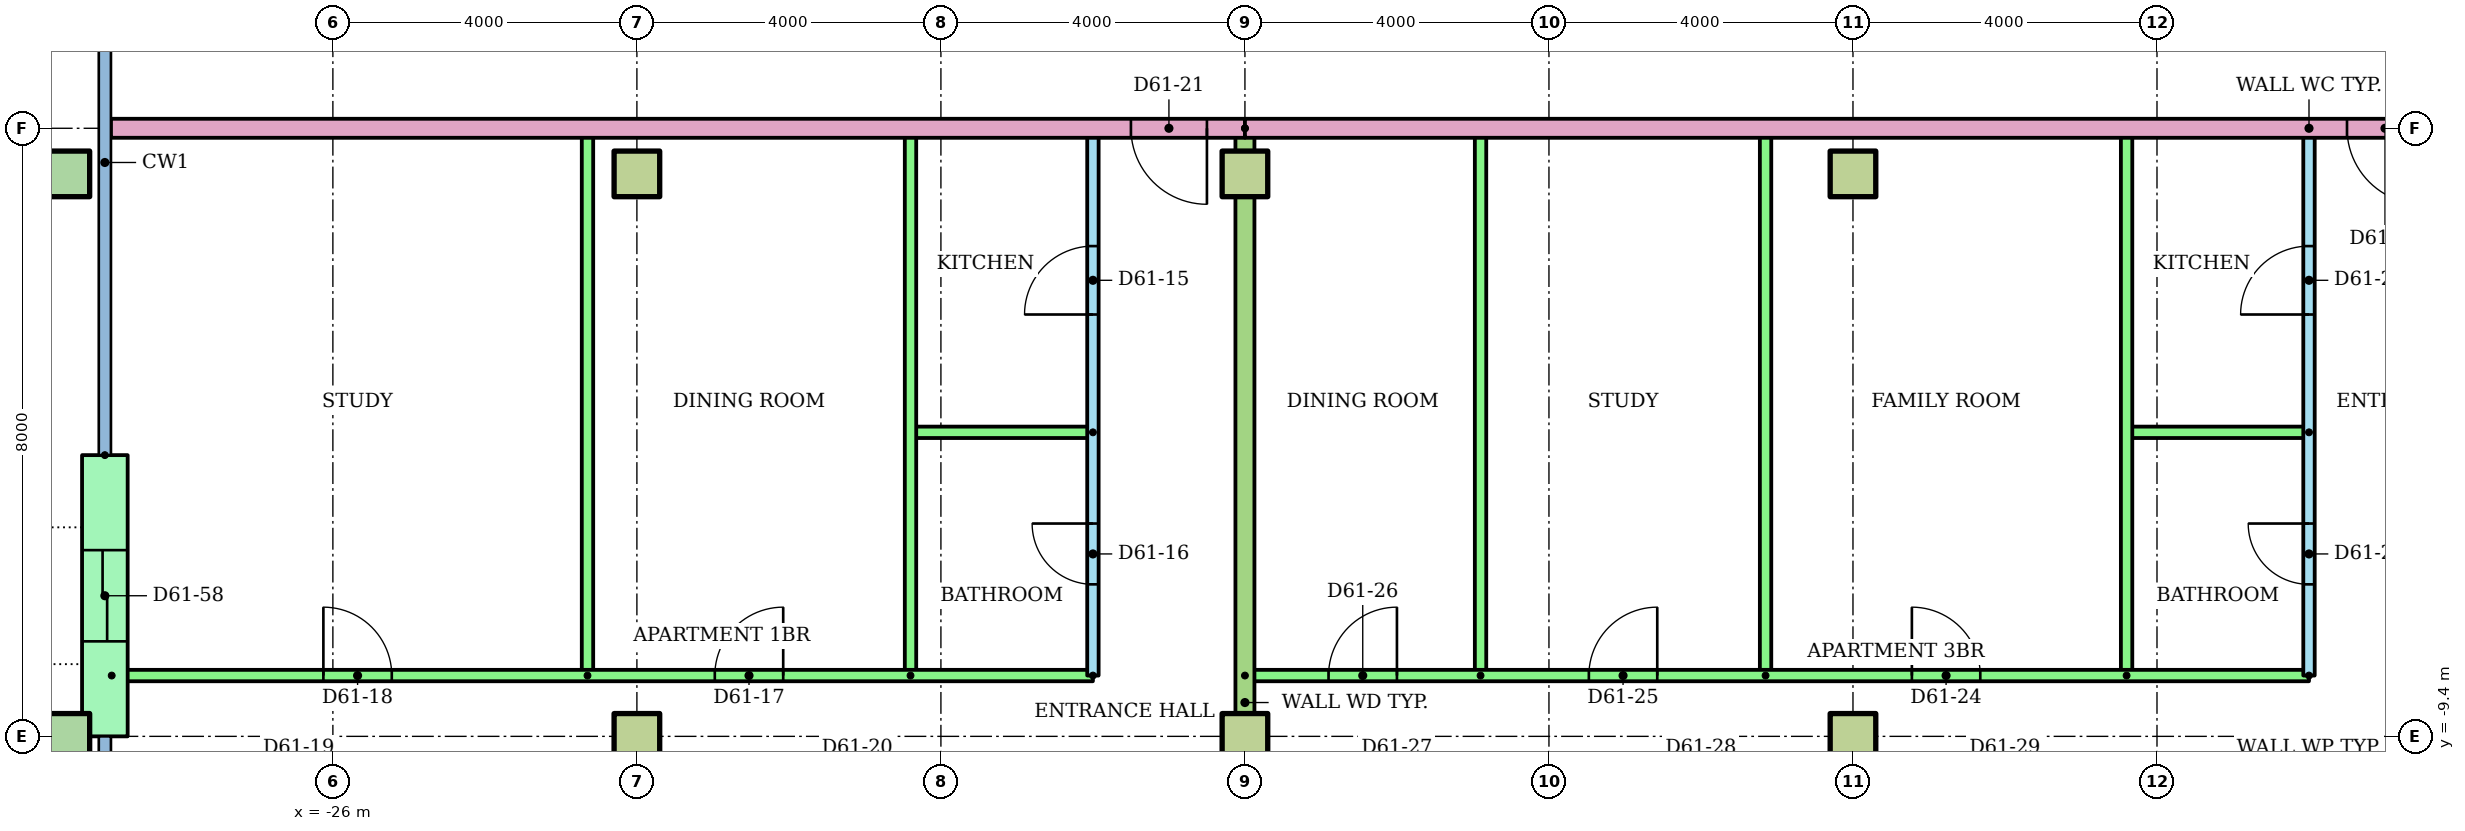
"""IFC4 building model, lengths in metres.
Left out: names, types, materials, properties, quantities, classifications, styles, units other than length and angle.
Written with IfcOpenShell. Run it as: python <this file> out.ifc"""

import sys

from ifc_helpers import new_model, si_unit, direction, frame, frame_2d, origin, origin_2d, place, context, subcontext, project, spatial, rectangle, hollow_rectangle, extrude, element, fill, save


model = new_model("IFC4")
c1 = context("Model", 3, precision=1e-05, world=origin(), true_north=direction((0.0, 1.0)))
c2 = subcontext(c1, "Body", "Model", "MODEL_VIEW")
j1 = project(units=[si_unit("LENGTHUNIT", "METRE"), si_unit("PLANEANGLEUNIT", "RADIAN")], contexts=[c1])
p1 = place(None, origin())
s1 = spatial("IfcSite", under=j1, at=p1, CompositionType="ELEMENT")
p2 = place(p1, origin())
s2 = spatial("IfcBuilding", under=s1, at=p2, CompositionType="ELEMENT")
p3 = place(p2, frame((0.0, 0.0, 233.2)))
s3 = spatial("IfcBuildingStorey", under=s2, at=p3, CompositionType="ELEMENT", Elevation=233.2)
p4 = place(p3, frame((-29.5, -9.4, 0.0)))
e1 = element("IfcColumn", 1, at=p4, inside=s3, PredefinedType="COLUMN", context=c2, shape_type="SweptSolid", body=[
    extrude(hollow_rectangle(XDim=0.6, YDim=0.6, WallThickness=0.03, at=origin_2d()), origin(), (0.0, 0.0, 1.0), 3.2),
])
for number, where in (
    (2, (-22.0, -9.4, 0.0)),
    (3, (-14.0, -9.4, 0.0)),
    (4, (-6.0, -9.4, 0.0)),
):
    element("IfcColumn", number, at=place(p3, frame(where)), inside=s3, PredefinedType="COLUMN", context=c2, shape_type="SweptSolid", body=[
        extrude(rectangle(XDim=0.6, YDim=0.6, at=origin_2d()), origin(), (0.0, 0.0, 1.0), 3.2),
    ])
p5 = place(p3, frame((-29.5, -2.0, 0.0)))
e5 = element("IfcColumn", 5, at=p5, inside=s3, PredefinedType="COLUMN", context=c2, shape_type="SweptSolid", body=[
    extrude(hollow_rectangle(XDim=0.6, YDim=0.6, WallThickness=0.03, at=origin_2d()), origin(), (0.0, 0.0, 1.0), 3.2),
])
for number, where in (
    (6, (-22.0, -2.0, 0.0)),
    (7, (-14.0, -2.0, 0.0)),
    (8, (-6.0, -2.0, 0.0)),
):
    element("IfcColumn", number, at=place(p3, frame(where)), inside=s3, PredefinedType="COLUMN", context=c2, shape_type="SweptSolid", body=[
        extrude(rectangle(XDim=0.6, YDim=0.6, at=origin_2d()), origin(), (0.0, 0.0, 1.0), 3.2),
    ])
p6 = place(p3, frame((-29.0, -5.7, 0.0), z_axis=(0.0, 0.0, 1.0), x_axis=(0.0, -1.0, 0.0)))
e9 = element("IfcWall", 9, at=p6, inside=s3, PredefinedType="STANDARD", context=c2, shape_type="SweptSolid", body=[
    extrude(rectangle(XDim=3.7, YDim=0.6, at=frame_2d((1.85, 0.0))), origin(), (0.0, 0.0, 1.0), 2.92),
])
p7 = place(p6, frame((1.25, 0.0, 0.0)))
e10 = element("IfcOpeningElement", 10, at=p7, cuts=e9, PredefinedType="OPENING", context=c2, shape_type="SweptSolid", body=[
    extrude(rectangle(XDim=1.2, YDim=2.1, at=frame_2d((0.6, 1.05))), frame((0.0, 0.31, 0.0), z_axis=(0.0, -1.0, 0.0), x_axis=(1.0, 0.0, 0.0)), (0.0, 0.0, 1.0), 0.62),
])
p8 = place(p3, frame((-16.0, -8.6, 0.0), z_axis=(0.0, 0.0, 1.0), x_axis=(0.0, 1.0, 0.0)))
e11 = element("IfcWall", 11, at=p8, inside=s3, PredefinedType="PARTITIONING", context=c2, shape_type="SweptSolid", body=[
    extrude(rectangle(XDim=7.2, YDim=0.15, at=frame_2d((3.6, 0.0))), origin(), (0.0, 0.0, 1.0), 2.4),
])
p9 = place(p8, frame((4.75, 0.0, 0.0)))
e12 = element("IfcOpeningElement", 12, at=p9, cuts=e11, PredefinedType="OPENING", context=c2, shape_type="SweptSolid", body=[
    extrude(rectangle(XDim=0.9, YDim=2.1, at=frame_2d((0.45, 1.05))), frame((0.0, 0.085, 0.0), z_axis=(0.0, -1.0, 0.0), x_axis=(1.0, 0.0, 0.0)), (0.0, 0.0, 1.0), 0.17),
])
p10 = place(p8, frame((1.2, 0.0, 0.0)))
e13 = element("IfcOpeningElement", 13, at=p10, cuts=e11, PredefinedType="OPENING", context=c2, shape_type="SweptSolid", body=[
    extrude(rectangle(XDim=0.8, YDim=2.1, at=frame_2d((0.4, 1.05))), frame((0.0, 0.085, 0.0), z_axis=(0.0, -1.0, 0.0), x_axis=(1.0, 0.0, 0.0)), (0.0, 0.0, 1.0), 0.17),
])
p11 = place(p3, frame((-16.0, -5.4, 0.0), z_axis=(0.0, 0.0, 1.0), x_axis=(-1.0, 0.0, 0.0)))
e14 = element("IfcWall", 14, at=p11, inside=s3, PredefinedType="PARTITIONING", context=c2, shape_type="SweptSolid", body=[
    extrude(rectangle(XDim=2.4, YDim=0.15, at=frame_2d((1.2, 0.0))), origin(), (0.0, 0.0, 1.0), 2.4),
])
for number, where, z_axis, x_axis in (
    (15, (-18.4, -8.6, 0.0), (0.0, 0.0, 1.0), (0.0, 1.0, 0.0)),
    (16, (-22.65, -8.6, 0.0), (0.0, 0.0, 1.0), (0.0, 1.0, 0.0)),
):
    element("IfcWall", number, at=place(p3, frame(where, z_axis=z_axis, x_axis=x_axis)), inside=s3, PredefinedType="PARTITIONING", context=c2, shape_type="SweptSolid", body=[
        extrude(rectangle(XDim=7.2, YDim=0.15, at=frame_2d((3.6, 0.0))), origin(), (0.0, 0.0, 1.0), 2.4),
    ])
p12 = place(p3, frame((-28.91, -8.6, 0.0)))
e17 = element("IfcWall", 17, at=p12, inside=s3, PredefinedType="PARTITIONING", context=c2, shape_type="SweptSolid", body=[
    extrude(rectangle(XDim=12.91, YDim=0.15, at=frame_2d((6.455, 0.0))), origin(), (0.0, 0.0, 1.0), 2.4),
])
p13 = place(p12, frame((7.935, 0.0, 0.0)))
e18 = element("IfcOpeningElement", 18, at=p13, cuts=e17, PredefinedType="OPENING", context=c2, shape_type="SweptSolid", body=[
    extrude(rectangle(XDim=0.9, YDim=2.1, at=frame_2d((0.45, 1.05))), frame((0.0, 0.085, 0.0), z_axis=(0.0, -1.0, 0.0), x_axis=(1.0, 0.0, 0.0)), (0.0, 0.0, 1.0), 0.17),
])
p14 = place(p12, frame((2.785, 0.0, 0.0)))
e19 = element("IfcOpeningElement", 19, at=p14, cuts=e17, PredefinedType="OPENING", context=c2, shape_type="SweptSolid", body=[
    extrude(rectangle(XDim=0.9, YDim=2.1, at=frame_2d((0.45, 1.05))), frame((0.0, 0.085, 0.0), z_axis=(0.0, -1.0, 0.0), x_axis=(1.0, 0.0, 0.0)), (0.0, 0.0, 1.0), 0.17),
])
p15 = place(p3, frame((0.0, -8.6, 0.0), z_axis=(0.0, 0.0, 1.0), x_axis=(0.0, 1.0, 0.0)))
e20 = element("IfcWall", 20, at=p15, inside=s3, PredefinedType="PARTITIONING", context=c2, shape_type="SweptSolid", body=[
    extrude(rectangle(XDim=7.2, YDim=0.15, at=frame_2d((3.6, 0.0))), origin(), (0.0, 0.0, 1.0), 2.4),
])
p16 = place(p15, frame((4.75, 0.0, 0.0)))
e21 = element("IfcOpeningElement", 21, at=p16, cuts=e20, PredefinedType="OPENING", context=c2, shape_type="SweptSolid", body=[
    extrude(rectangle(XDim=0.9, YDim=2.1, at=frame_2d((0.45, 1.05))), frame((0.0, 0.085, 0.0), z_axis=(0.0, -1.0, 0.0), x_axis=(1.0, 0.0, 0.0)), (0.0, 0.0, 1.0), 0.17),
])
p17 = place(p15, frame((1.2, 0.0, 0.0)))
e22 = element("IfcOpeningElement", 22, at=p17, cuts=e20, PredefinedType="OPENING", context=c2, shape_type="SweptSolid", body=[
    extrude(rectangle(XDim=0.8, YDim=2.1, at=frame_2d((0.4, 1.05))), frame((0.0, 0.085, 0.0), z_axis=(0.0, -1.0, 0.0), x_axis=(1.0, 0.0, 0.0)), (0.0, 0.0, 1.0), 0.17),
])
p18 = place(p3, frame((0.0, -5.4, 0.0), z_axis=(0.0, 0.0, 1.0), x_axis=(-1.0, 0.0, 0.0)))
e23 = element("IfcWall", 23, at=p18, inside=s3, PredefinedType="PARTITIONING", context=c2, shape_type="SweptSolid", body=[
    extrude(rectangle(XDim=2.4, YDim=0.15, at=frame_2d((1.2, 0.0))), origin(), (0.0, 0.0, 1.0), 2.4),
])
for number, where, z_axis, x_axis in (
    (24, (-2.4, -8.6, 0.0), (0.0, 0.0, 1.0), (0.0, 1.0, 0.0)),
    (25, (-7.15, -8.6, 0.0), (0.0, 0.0, 1.0), (0.0, 1.0, 0.0)),
    (26, (-10.9, -8.6, 0.0), (0.0, 0.0, 1.0), (0.0, 1.0, 0.0)),
):
    element("IfcWall", number, at=place(p3, frame(where, z_axis=z_axis, x_axis=x_axis)), inside=s3, PredefinedType="PARTITIONING", context=c2, shape_type="SweptSolid", body=[
        extrude(rectangle(XDim=7.2, YDim=0.15, at=frame_2d((3.6, 0.0))), origin(), (0.0, 0.0, 1.0), 2.4),
    ])
p19 = place(p3, frame((-14.0, -8.6, 0.0)))
e27 = element("IfcWall", 27, at=p19, inside=s3, PredefinedType="PARTITIONING", context=c2, shape_type="SweptSolid", body=[
    extrude(rectangle(XDim=14.0, YDim=0.15, at=frame_2d((7.0, 0.0))), origin(), (0.0, 0.0, 1.0), 2.4),
])
p20 = place(p19, frame((8.775, 0.0, 0.0)))
e28 = element("IfcOpeningElement", 28, at=p20, cuts=e27, PredefinedType="OPENING", context=c2, shape_type="SweptSolid", body=[
    extrude(rectangle(XDim=0.9, YDim=2.1, at=frame_2d((0.45, 1.05))), frame((0.0, 0.085, 0.0), z_axis=(0.0, -1.0, 0.0), x_axis=(1.0, 0.0, 0.0)), (0.0, 0.0, 1.0), 0.17),
])
p21 = place(p19, frame((4.525, 0.0, 0.0)))
e29 = element("IfcOpeningElement", 29, at=p21, cuts=e27, PredefinedType="OPENING", context=c2, shape_type="SweptSolid", body=[
    extrude(rectangle(XDim=0.9, YDim=2.1, at=frame_2d((0.45, 1.05))), frame((0.0, 0.085, 0.0), z_axis=(0.0, -1.0, 0.0), x_axis=(1.0, 0.0, 0.0)), (0.0, 0.0, 1.0), 0.17),
])
p22 = place(p19, frame((1.1, 0.0, 0.0)))
e30 = element("IfcOpeningElement", 30, at=p22, cuts=e27, PredefinedType="OPENING", context=c2, shape_type="SweptSolid", body=[
    extrude(rectangle(XDim=0.9, YDim=2.1, at=frame_2d((0.45, 1.05))), frame((0.0, 0.085, 0.0), z_axis=(0.0, -1.0, 0.0), x_axis=(1.0, 0.0, 0.0)), (0.0, 0.0, 1.0), 0.17),
])
p23 = place(p3, frame((-14.0, -1.4, 0.0), z_axis=(0.0, 0.0, 1.0), x_axis=(0.0, -1.0, 0.0)))
e31 = element("IfcWall", 31, at=p23, inside=s3, PredefinedType="PARTITIONING", context=c2, shape_type="SweptSolid", body=[
    extrude(rectangle(XDim=15.11, YDim=0.25, at=frame_2d((7.555, 0.0))), origin(), (0.0, 0.0, 1.0), 2.4),
])
p24 = place(p3, frame((-14.0, -1.4, 0.0), z_axis=(0.0, 0.0, 1.0), x_axis=(-1.0, 0.0, 0.0)))
e32 = element("IfcWall", 32, at=p24, inside=s3, PredefinedType="PARTITIONING", context=c2, shape_type="SweptSolid", body=[
    extrude(rectangle(XDim=14.92, YDim=0.25, at=frame_2d((7.46, 0.0))), origin(), (0.0, 0.0, 1.0), 2.4),
])
p25 = place(p24, frame((0.5, 0.0, 0.0)))
e33 = element("IfcOpeningElement", 33, at=p25, cuts=e32, PredefinedType="OPENING", context=c2, shape_type="SweptSolid", body=[
    extrude(rectangle(XDim=1.0, YDim=2.1, at=frame_2d((0.5, 1.05))), frame((0.0, 0.135, 0.0), z_axis=(0.0, -1.0, 0.0), x_axis=(1.0, 0.0, 0.0)), (0.0, 0.0, 1.0), 0.27),
])
p26 = place(p3, frame((14.0, -1.4, 0.0), z_axis=(0.0, 0.0, 1.0), x_axis=(-1.0, 0.0, 0.0)))
e34 = element("IfcWall", 34, at=p26, inside=s3, PredefinedType="PARTITIONING", context=c2, shape_type="SweptSolid", body=[
    extrude(rectangle(XDim=28.0, YDim=0.25, at=frame_2d((14.0, 0.0))), origin(), (0.0, 0.0, 1.0), 2.4),
])
p27 = place(p26, frame((12.5, 0.0, 0.0)))
e35 = element("IfcOpeningElement", 35, at=p27, cuts=e34, PredefinedType="OPENING", context=c2, shape_type="SweptSolid", body=[
    extrude(rectangle(XDim=1.0, YDim=2.1, at=frame_2d((0.5, 1.05))), frame((0.0, 0.135, 0.0), z_axis=(0.0, -1.0, 0.0), x_axis=(1.0, 0.0, 0.0)), (0.0, 0.0, 1.0), 0.27),
])
p28 = place(p26, frame((10.5, 0.0, 0.0)))
e36 = element("IfcOpeningElement", 36, at=p28, cuts=e34, PredefinedType="OPENING", context=c2, shape_type="SweptSolid", body=[
    extrude(rectangle(XDim=1.0, YDim=2.1, at=frame_2d((0.5, 1.05))), frame((0.0, 0.135, 0.0), z_axis=(0.0, -1.0, 0.0), x_axis=(1.0, 0.0, 0.0)), (0.0, 0.0, 1.0), 0.27),
])
p29 = place(p9, origin())
e37 = element("IfcDoor", 37, at=p29, inside=s3, OperationType="SINGLE_SWING_LEFT", PredefinedType="DOOR", context=c2, shape_type="SweptSolid", body=[
    extrude(rectangle(XDim=0.9, YDim=2.1, at=frame_2d((0.45, 1.05))), frame((0.0, 0.025, 0.0), z_axis=(0.0, -1.0, 0.0), x_axis=(1.0, 0.0, 0.0)), (0.0, 0.0, 1.0), 0.05),
])
fill(e12, e37)
p30 = place(p10, origin())
e38 = element("IfcDoor", 38, at=p30, inside=s3, OperationType="SINGLE_SWING_RIGHT", PredefinedType="DOOR", context=c2, shape_type="SweptSolid", body=[
    extrude(rectangle(XDim=0.8, YDim=2.1, at=frame_2d((0.4, 1.05))), frame((0.0, 0.025, 0.0), z_axis=(0.0, -1.0, 0.0), x_axis=(1.0, 0.0, 0.0)), (0.0, 0.0, 1.0), 0.05),
])
fill(e13, e38)
p31 = place(p13, origin())
e39 = element("IfcDoor", 39, at=p31, inside=s3, OperationType="SINGLE_SWING_RIGHT", PredefinedType="DOOR", context=c2, shape_type="SweptSolid", body=[
    extrude(rectangle(XDim=0.9, YDim=2.1, at=frame_2d((0.45, 1.05))), frame((0.0, 0.025, 0.0), z_axis=(0.0, -1.0, 0.0), x_axis=(1.0, 0.0, 0.0)), (0.0, 0.0, 1.0), 0.05),
])
fill(e18, e39)
p32 = place(p14, origin())
e40 = element("IfcDoor", 40, at=p32, inside=s3, OperationType="SINGLE_SWING_LEFT", PredefinedType="DOOR", context=c2, shape_type="SweptSolid", body=[
    extrude(rectangle(XDim=0.9, YDim=2.1, at=frame_2d((0.45, 1.05))), frame((0.0, 0.025, 0.0), z_axis=(0.0, -1.0, 0.0), x_axis=(1.0, 0.0, 0.0)), (0.0, 0.0, 1.0), 0.05),
])
fill(e19, e40)
p33 = place(p25, origin())
e41 = element("IfcDoor", 41, at=p33, inside=s3, OperationType="SINGLE_SWING_LEFT", PredefinedType="DOOR", context=c2, shape_type="SweptSolid", body=[
    extrude(rectangle(XDim=1.0, YDim=2.1, at=frame_2d((0.5, 1.05))), frame((0.0, 0.025, 0.0), z_axis=(0.0, -1.0, 0.0), x_axis=(1.0, 0.0, 0.0)), (0.0, 0.0, 1.0), 0.05),
])
fill(e33, e41)
p34 = place(p16, origin())
e42 = element("IfcDoor", 42, at=p34, inside=s3, OperationType="SINGLE_SWING_LEFT", PredefinedType="DOOR", context=c2, shape_type="SweptSolid", body=[
    extrude(rectangle(XDim=0.9, YDim=2.1, at=frame_2d((0.45, 1.05))), frame((0.0, 0.025, 0.0), z_axis=(0.0, -1.0, 0.0), x_axis=(1.0, 0.0, 0.0)), (0.0, 0.0, 1.0), 0.05),
])
fill(e21, e42)
p35 = place(p17, origin())
e43 = element("IfcDoor", 43, at=p35, inside=s3, OperationType="SINGLE_SWING_RIGHT", PredefinedType="DOOR", context=c2, shape_type="SweptSolid", body=[
    extrude(rectangle(XDim=0.8, YDim=2.1, at=frame_2d((0.4, 1.05))), frame((0.0, 0.025, 0.0), z_axis=(0.0, -1.0, 0.0), x_axis=(1.0, 0.0, 0.0)), (0.0, 0.0, 1.0), 0.05),
])
fill(e22, e43)
p36 = place(p20, origin())
e44 = element("IfcDoor", 44, at=p36, inside=s3, OperationType="SINGLE_SWING_LEFT", PredefinedType="DOOR", context=c2, shape_type="SweptSolid", body=[
    extrude(rectangle(XDim=0.9, YDim=2.1, at=frame_2d((0.45, 1.05))), frame((0.0, 0.025, 0.0), z_axis=(0.0, -1.0, 0.0), x_axis=(1.0, 0.0, 0.0)), (0.0, 0.0, 1.0), 0.05),
])
fill(e28, e44)
p37 = place(p21, origin())
e45 = element("IfcDoor", 45, at=p37, inside=s3, OperationType="SINGLE_SWING_RIGHT", PredefinedType="DOOR", context=c2, shape_type="SweptSolid", body=[
    extrude(rectangle(XDim=0.9, YDim=2.1, at=frame_2d((0.45, 1.05))), frame((0.0, 0.025, 0.0), z_axis=(0.0, -1.0, 0.0), x_axis=(1.0, 0.0, 0.0)), (0.0, 0.0, 1.0), 0.05),
])
fill(e29, e45)
p38 = place(p22, origin())
e46 = element("IfcDoor", 46, at=p38, inside=s3, OperationType="SINGLE_SWING_RIGHT", PredefinedType="DOOR", context=c2, shape_type="SweptSolid", body=[
    extrude(rectangle(XDim=0.9, YDim=2.1, at=frame_2d((0.45, 1.05))), frame((0.0, 0.025, 0.0), z_axis=(0.0, -1.0, 0.0), x_axis=(1.0, 0.0, 0.0)), (0.0, 0.0, 1.0), 0.05),
])
fill(e30, e46)
p39 = place(p27, origin())
e47 = element("IfcDoor", 47, at=p39, inside=s3, OperationType="SINGLE_SWING_LEFT", PredefinedType="DOOR", context=c2, shape_type="SweptSolid", body=[
    extrude(rectangle(XDim=1.0, YDim=2.1, at=frame_2d((0.5, 1.05))), frame((0.0, 0.025, 0.0), z_axis=(0.0, -1.0, 0.0), x_axis=(1.0, 0.0, 0.0)), (0.0, 0.0, 1.0), 0.05),
])
fill(e35, e47)
p40 = place(p7, origin())
e48 = element("IfcDoor", 48, at=p40, inside=s3, OperationType="SLIDING_TO_LEFT", PredefinedType="DOOR", context=c2, shape_type="SweptSolid", body=[
    extrude(rectangle(XDim=1.2, YDim=2.1, at=frame_2d((0.6, 1.05))), frame((0.0, 0.025, 0.0), z_axis=(0.0, -1.0, 0.0), x_axis=(1.0, 0.0, 0.0)), (0.0, 0.0, 1.0), 0.05),
])
fill(e10, e48)
save(model, sys.argv[1])
